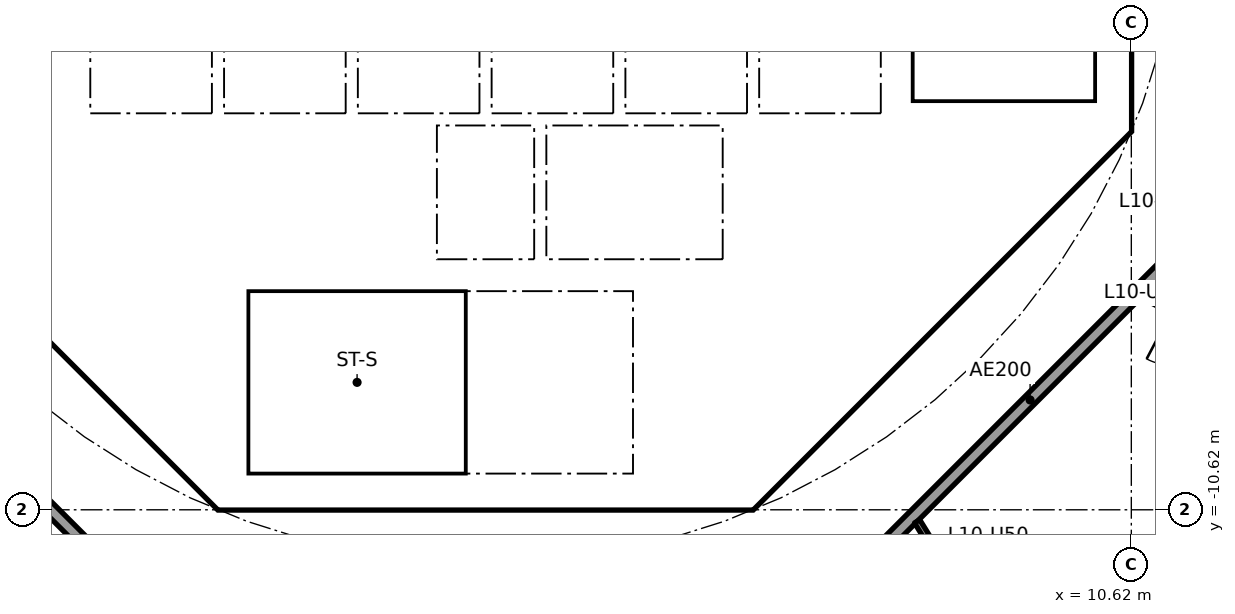
"""IFC4 building model, lengths in metres.
Left out: names, types, materials, properties, quantities, classifications, styles, units other than length and angle.
Written with IfcOpenShell. Run it as: python <this file> out.ifc"""

import sys

from ifc_helpers import new_model, si_unit, direction, frame, frame_2d, origin, place, context, subcontext, project, spatial, polyline, rectangle, outline, extrude, element, fill, save


model = new_model("IFC4")
c1 = context("Model", 3, precision=1e-05, world=origin(), true_north=direction((0.0, 1.0)))
c2 = subcontext(c1, "Body", "Model", "MODEL_VIEW")
j1 = project(units=[si_unit("LENGTHUNIT", "METRE"), si_unit("PLANEANGLEUNIT", "RADIAN")], contexts=[c1])
p1 = place(None, origin())
s1 = spatial("IfcSite", under=j1, at=p1, CompositionType="ELEMENT")
p2 = place(p1, origin())
s2 = spatial("IfcBuilding", under=s1, at=p2, CompositionType="ELEMENT")
p3 = place(p2, frame((0.0, 0.0, 45.5)))
s3 = spatial("IfcBuildingStorey", under=s2, at=p3, CompositionType="ELEMENT", Elevation=45.5)
p4 = place(p3, frame((-9.988, -4.613, 0.0), z_axis=(0.0, 0.0, 1.0), x_axis=(0.707106781187, -0.707106781187, 0.0)))
e1 = element("IfcWall", 1, at=p4, inside=s3, PredefinedType="SHEAR", context=c2, shape_type="SweptSolid", body=[
    extrude(rectangle(XDim=7.602, YDim=0.6, at=frame_2d((3.801, 0.0))), origin(), (0.0, 0.0, 1.0), 3.44),
])
p5 = place(p4, frame((6.151, 0.0, 0.0)))
e2 = element("IfcOpeningElement", 2, at=p5, cuts=e1, PredefinedType="OPENING", context=c2, shape_type="SweptSolid", body=[
    extrude(rectangle(XDim=1.1, YDim=2.1, at=frame_2d((0.55, 1.05))), frame((0.0, 0.31, 0.0), z_axis=(0.0, -1.0, 0.0), x_axis=(1.0, 0.0, 0.0)), (0.0, 0.0, 1.0), 0.62),
])
p6 = place(p3, frame((4.613, -9.988, 0.0), z_axis=(0.0, 0.0, 1.0), x_axis=(0.707106781187, 0.707106781187, 0.0)))
e3 = element("IfcWall", 3, at=p6, inside=s3, PredefinedType="SHEAR", context=c2, shape_type="SweptSolid", body=[
    extrude(rectangle(XDim=7.602, YDim=0.6, at=frame_2d((3.801, 0.0))), origin(), (0.0, 0.0, 1.0), 3.44),
])
p7 = place(p6, frame((3.201, 0.0, 0.0)))
e4 = element("IfcOpeningElement", 4, at=p7, cuts=e3, PredefinedType="OPENING", context=c2, shape_type="SweptSolid", body=[
    extrude(rectangle(XDim=1.2, YDim=2.1, at=frame_2d((0.6, 1.05))), frame((0.0, 0.31, 0.0), z_axis=(0.0, -1.0, 0.0), x_axis=(1.0, 0.0, 0.0)), (0.0, 0.0, 1.0), 0.62),
])
p8 = place(p3, frame((4.0, -10.025, 0.0), z_axis=(0.0, 0.0, 1.0), x_axis=(0.0, 1.0, 0.0)))
e5 = element("IfcWall", 5, at=p8, inside=s3, PredefinedType="SOLIDWALL", context=c2, shape_type="SweptSolid", body=[
    extrude(rectangle(XDim=3.0, YDim=0.2, at=frame_2d((1.5, 0.0))), origin(), (0.0, 0.0, 1.0), 3.44),
])
p9 = place(p8, frame((0.975, 0.0, 0.0)))
e6 = element("IfcOpeningElement", 6, at=p9, cuts=e5, PredefinedType="OPENING", context=c2, shape_type="SweptSolid", body=[
    extrude(rectangle(XDim=1.1, YDim=2.1, at=frame_2d((0.55, 1.05))), frame((0.0, 0.11, 0.0), z_axis=(0.0, -1.0, 0.0), x_axis=(1.0, 0.0, 0.0)), (0.0, 0.0, 1.0), 0.22),
])
p10 = place(p3, frame((-6.2, -7.827, 0.0), z_axis=(0.0, 0.0, 1.0), x_axis=(0.0, 1.0, 0.0)))
e7 = element("IfcWall", 7, at=p10, inside=s3, PredefinedType="PARTITIONING", context=c2, shape_type="SweptSolid", body=[
    extrude(rectangle(XDim=3.527, YDim=0.15, at=frame_2d((1.763, 0.0))), origin(), (0.0, 0.0, 1.0), 3.44),
])
p11 = place(p10, frame((1.276, 0.0, 0.0)))
e8 = element("IfcOpeningElement", 8, at=p11, cuts=e7, PredefinedType="OPENING", context=c2, shape_type="SweptSolid", body=[
    extrude(rectangle(XDim=0.9, YDim=2.1, at=frame_2d((0.45, 1.05))), frame((0.0, 0.085, 0.0), z_axis=(0.0, -1.0, 0.0), x_axis=(1.0, 0.0, 0.0)), (0.0, 0.0, 1.0), 0.17),
])
p12 = place(p3, frame((4.0, -6.5, 0.0), z_axis=(0.0, 0.0, 1.0), x_axis=(0.0, 1.0, 0.0)))
e9 = element("IfcWall", 9, at=p12, inside=s3, PredefinedType="SOLIDWALL", context=c2, shape_type="SweptSolid", body=[
    extrude(rectangle(XDim=2.2, YDim=0.2, at=frame_2d((1.1, 0.0))), origin(), (0.0, 0.0, 1.0), 3.44),
])
p13 = place(p12, frame((0.55, 0.0, 0.0)))
e10 = element("IfcOpeningElement", 10, at=p13, cuts=e9, PredefinedType="OPENING", context=c2, shape_type="SweptSolid", body=[
    extrude(rectangle(XDim=1.1, YDim=2.1, at=frame_2d((0.55, 1.05))), frame((0.0, 0.11, 0.0), z_axis=(0.0, -1.0, 0.0), x_axis=(1.0, 0.0, 0.0)), (0.0, 0.0, 1.0), 0.22),
])
p14 = place(p3, frame((-4.0, -6.5, 0.0), z_axis=(0.0, 0.0, 1.0), x_axis=(0.0, 1.0, 0.0)))
e11 = element("IfcWall", 11, at=p14, inside=s3, PredefinedType="SOLIDWALL", context=c2, shape_type="SweptSolid", body=[
    extrude(rectangle(XDim=2.2, YDim=0.2, at=frame_2d((1.1, 0.0))), origin(), (0.0, 0.0, 1.0), 3.44),
])
p15 = place(p14, frame((0.65, 0.0, 0.0)))
e12 = element("IfcOpeningElement", 12, at=p15, cuts=e11, PredefinedType="OPENING", context=c2, shape_type="SweptSolid", body=[
    extrude(rectangle(XDim=0.9, YDim=2.1, at=frame_2d((0.45, 1.05))), frame((0.0, 0.11, 0.0), z_axis=(0.0, -1.0, 0.0), x_axis=(1.0, 0.0, 0.0)), (0.0, 0.0, 1.0), 0.22),
])
p16 = place(p3, origin())
e13 = element("IfcWall", 13, at=p16, inside=s3, PredefinedType="SHEAR", context=c2, shape_type="SweptSolid", body=[
    extrude(outline(polyline([(-4.152, -10.025), (4.152, -10.025), (4.401, -9.776), (4.825, -10.2), (4.401, -10.625), (-4.401, -10.625), (-4.825, -10.2), (-4.401, -9.776), (-4.152, -10.025)])), origin(), (0.0, 0.0, 1.0), 3.44),
])
p17 = place(p3, origin())
e14 = element("IfcWall", 14, at=p17, inside=s3, PredefinedType="SHEAR", context=c2, shape_type="SweptSolid", body=[
    extrude(outline(polyline([(9.776, -4.401), (10.025, -4.152), (10.025, -3.801), (10.025, 4.152), (9.776, 4.401), (10.2, 4.825), (10.625, 4.401), (10.625, -4.401), (10.2, -4.825), (9.776, -4.401)])), origin(), (0.0, 0.0, 1.0), 3.44),
])
for number, where, z_axis, x_axis in (
    (15, (-0.9, -6.5, 0.0), (0.0, 0.0, 1.0), (0.0, 1.0, 0.0)),
    (16, (0.9, -6.5, 0.0), (0.0, 0.0, 1.0), (0.0, 1.0, 0.0)),
):
    element("IfcWall", number, at=place(p3, frame(where, z_axis=z_axis, x_axis=x_axis)), inside=s3, PredefinedType="SOLIDWALL", context=c2, shape_type="SweptSolid", body=[
        extrude(rectangle(XDim=2.2, YDim=0.2, at=frame_2d((1.1, 0.0))), origin(), (0.0, 0.0, 1.0), 3.44),
    ])
p18 = place(p3, origin())
e17 = element("IfcWall", 17, at=p18, inside=s3, PredefinedType="SOLIDWALL", context=c2, shape_type="SweptSolid", body=[
    extrude(outline(polyline([(-6.7, -2.1), (-6.5, -2.1), (-6.5, -4.1), (-4.5, -4.1), (-4.5, -2.1), (-4.3, -2.1), (-4.3, -4.1), (-2.3, -4.1), (-2.3, -2.1), (-2.1, -2.1), (-2.1, -4.1), (-0.1, -4.1), (-0.1, -2.1), (0.1, -2.1), (0.1, -4.1), (2.1, -4.1), (2.1, -2.1), (2.3, -2.1), (2.3, -4.1), (4.3, -4.1), (4.3, -2.1), (4.5, -2.1), (4.5, -4.1), (6.5, -4.1), (6.5, -2.1), (6.7, -2.1), (6.7, -4.3), (-6.7, -4.3), (-6.7, -2.1)])), origin(), (0.0, 0.0, 1.0), 3.44),
])
p19 = place(p3, frame((-10.025, -4.0, 0.0), z_axis=(0.0, 0.0, 1.0), x_axis=(1.0, 0.0, 0.0)))
e18 = element("IfcWall", 18, at=p19, inside=s3, PredefinedType="PARTITIONING", context=c2, shape_type="SweptSolid", body=[
    extrude(rectangle(XDim=3.325, YDim=0.2, at=frame_2d((1.662, 0.0))), origin(), (0.0, 0.0, 1.0), 3.44),
])
p20 = place(p3, origin())
e19 = element("IfcWall", 19, at=p20, inside=s3, PredefinedType="SOLIDWALL", context=c2, shape_type="SweptSolid", body=[
    extrude(outline(polyline([(-3.9, -10.025), (-4.1, -10.025), (-4.1, -7.025), (-3.9, -7.025), (-3.9, -10.025)])), origin(), (0.0, 0.0, 1.0), 3.44),
])
p21 = place(p3, origin())
e20 = element("IfcWall", 20, at=p21, inside=s3, PredefinedType="SOLIDWALL", context=c2, shape_type="SweptSolid", body=[
    extrude(outline(polyline([(4.1, -7.025), (-4.1, -7.025), (-4.1, -6.5), (4.1, -6.5), (4.1, -7.025)])), origin(), (0.0, 0.0, 1.0), 3.44),
])
p22 = place(p3, origin())
e21 = element("IfcWall", 21, at=p22, inside=s3, PredefinedType="SOLIDWALL", context=c2, shape_type="SweptSolid", body=[
    extrude(outline(polyline([(7.025, -3.9), (6.7, -3.9), (6.7, 3.9), (7.025, 3.9), (7.025, -3.9)])), origin(), (0.0, 0.0, 1.0), 3.44),
])
p23 = place(p3, origin())
e22 = element("IfcWall", 22, at=p23, inside=s3, PredefinedType="SOLIDWALL", context=c2, shape_type="SweptSolid", body=[
    extrude(outline(polyline([(10.025, -4.1), (6.7, -4.1), (6.7, -3.9), (10.025, -3.9), (10.025, -4.1)])), origin(), (0.0, 0.0, 1.0), 3.44),
])
p24 = place(p3, frame((-12.635, -5.134, 0.0), z_axis=(0.0, 0.0, 1.0), x_axis=(0.707106781187, -0.707106781187, 0.0)))
e23 = element("IfcWall", 23, at=p24, inside=s3, PredefinedType="PARTITIONING", context=c2, shape_type="SweptSolid", body=[
    extrude(rectangle(XDim=10.609, YDim=0.2, at=frame_2d((5.305, 0.0))), origin(), (0.0, 0.0, 1.0), 3.44),
])
p25 = place(p3, frame((5.275, -12.494, 0.0), z_axis=(0.0, 0.0, 1.0), x_axis=(0.707106781187, 0.707106781187, 0.0)))
e24 = element("IfcWall", 24, at=p25, inside=s3, PredefinedType="PARTITIONING", context=c2, shape_type="SweptSolid", body=[
    extrude(rectangle(XDim=10.409, YDim=0.2, at=frame_2d((5.205, 0.0))), origin(), (0.0, 0.0, 1.0), 3.44),
])
p26 = place(p25, frame((8.508, 0.0, 0.0)))
e25 = element("IfcOpeningElement", 25, at=p26, cuts=e24, PredefinedType="OPENING", context=c2, shape_type="SweptSolid", body=[
    extrude(rectangle(XDim=1.0, YDim=2.1, at=frame_2d((0.5, 1.05))), frame((0.0, 0.11, 0.0), z_axis=(0.0, -1.0, 0.0), x_axis=(1.0, 0.0, 0.0)), (0.0, 0.0, 1.0), 0.22),
])
p27 = place(p3, frame((7.097, -10.81, 0.0), z_axis=(0.0, 0.0, 1.0), x_axis=(0.526453266471, -0.850204068576, 0.0)))
e26 = element("IfcWall", 26, at=p27, inside=s3, PredefinedType="PARTITIONING", context=c2, shape_type="SweptSolid", body=[
    extrude(rectangle(XDim=19.85, YDim=0.1, at=frame_2d((9.925, 0.0))), origin(), (0.0, 0.0, 1.0), 2.687),
])
p28 = place(p27, frame((0.35, 0.0, 0.0)))
e27 = element("IfcOpeningElement", 27, at=p28, cuts=e26, PredefinedType="OPENING", context=c2, shape_type="SweptSolid", body=[
    extrude(rectangle(XDim=0.9, YDim=2.1, at=frame_2d((0.45, 1.05))), frame((0.0, 0.06, 0.0), z_axis=(0.0, -1.0, 0.0), x_axis=(1.0, 0.0, 0.0)), (0.0, 0.0, 1.0), 0.12),
])
p29 = place(p27, frame((8.795, 0.0, 0.0)))
e28 = element("IfcOpeningElement", 28, at=p29, cuts=e26, PredefinedType="OPENING", context=c2, shape_type="SweptSolid", body=[
    extrude(rectangle(XDim=0.9, YDim=2.1, at=frame_2d((0.45, 1.05))), frame((0.0, 0.06, 0.0), z_axis=(0.0, -1.0, 0.0), x_axis=(1.0, 0.0, 0.0)), (0.0, 0.0, 1.0), 0.12),
])
p30 = place(p27, frame((15.935, 0.0, 0.0)))
e29 = element("IfcOpeningElement", 29, at=p30, cuts=e26, PredefinedType="OPENING", context=c2, shape_type="SweptSolid", body=[
    extrude(rectangle(XDim=0.9, YDim=2.1, at=frame_2d((0.45, 1.05))), frame((0.0, 0.06, 0.0), z_axis=(0.0, -1.0, 0.0), x_axis=(1.0, 0.0, 0.0)), (0.0, 0.0, 1.0), 0.12),
])
p31 = place(p3, frame((10.813, -7.091, 0.0), z_axis=(0.0, 0.0, 1.0), x_axis=(0.885182649479, -0.465243674928, 0.0)))
e30 = element("IfcWall", 30, at=p31, inside=s3, PredefinedType="PARTITIONING", context=c2, shape_type="SweptSolid", body=[
    extrude(rectangle(XDim=12.551, YDim=0.1, at=frame_2d((6.275, 0.0))), origin(), (0.0, 0.0, 1.0), 2.687),
])
p32 = place(p31, frame((0.539, 0.0, 0.0)))
e31 = element("IfcOpeningElement", 31, at=p32, cuts=e30, PredefinedType="OPENING", context=c2, shape_type="SweptSolid", body=[
    extrude(rectangle(XDim=0.9, YDim=2.1, at=frame_2d((0.45, 1.05))), frame((0.0, 0.06, 0.0), z_axis=(0.0, -1.0, 0.0), x_axis=(1.0, 0.0, 0.0)), (0.0, 0.0, 1.0), 0.12),
])
p33 = place(p31, frame((8.494, 0.0, 0.0)))
e32 = element("IfcOpeningElement", 32, at=p33, cuts=e30, PredefinedType="OPENING", context=c2, shape_type="SweptSolid", body=[
    extrude(rectangle(XDim=0.9, YDim=2.1, at=frame_2d((0.45, 1.05))), frame((0.0, 0.06, 0.0), z_axis=(0.0, -1.0, 0.0), x_axis=(1.0, 0.0, 0.0)), (0.0, 0.0, 1.0), 0.12),
])
p34 = place(p13, origin())
e33 = element("IfcDoor", 33, at=p34, inside=s3, OperationType="DOUBLE_DOOR_SLIDING", PredefinedType="DOOR", context=c2, shape_type="SweptSolid", body=[
    extrude(rectangle(XDim=1.1, YDim=2.1, at=frame_2d((0.55, 1.05))), frame((0.0, 0.025, 0.0), z_axis=(0.0, -1.0, 0.0), x_axis=(1.0, 0.0, 0.0)), (0.0, 0.0, 1.0), 0.05),
])
fill(e10, e33)
p35 = place(p9, origin())
e34 = element("IfcDoor", 34, at=p35, inside=s3, OperationType="SINGLE_SWING_RIGHT", PredefinedType="DOOR", context=c2, shape_type="SweptSolid", body=[
    extrude(rectangle(XDim=1.1, YDim=2.1, at=frame_2d((0.55, 1.05))), frame((0.0, 0.025, 0.0), z_axis=(0.0, -1.0, 0.0), x_axis=(1.0, 0.0, 0.0)), (0.0, 0.0, 1.0), 0.05),
])
fill(e6, e34)
p36 = place(p11, origin())
e35 = element("IfcDoor", 35, at=p36, inside=s3, OperationType="SINGLE_SWING_RIGHT", PredefinedType="DOOR", context=c2, shape_type="SweptSolid", body=[
    extrude(rectangle(XDim=0.9, YDim=2.1, at=frame_2d((0.45, 1.05))), frame((0.0, 0.025, 0.0), z_axis=(0.0, -1.0, 0.0), x_axis=(1.0, 0.0, 0.0)), (0.0, 0.0, 1.0), 0.05),
])
fill(e8, e35)
p37 = place(p15, frame((0.9, 0.0, 0.0), x_axis=(-1.0, 0.0, 0.0)))
e36 = element("IfcDoor", 36, at=p37, inside=s3, OperationType="SINGLE_SWING_RIGHT", PredefinedType="DOOR", context=c2, shape_type="SweptSolid", body=[
    extrude(rectangle(XDim=0.9, YDim=2.1, at=frame_2d((0.45, 1.05))), frame((0.0, 0.025, 0.0), z_axis=(0.0, -1.0, 0.0), x_axis=(1.0, 0.0, 0.0)), (0.0, 0.0, 1.0), 0.05),
])
fill(e12, e36)
p38 = place(p7, origin())
e37 = element("IfcDoor", 37, at=p38, inside=s3, OperationType="SINGLE_SWING_RIGHT", PredefinedType="DOOR", context=c2, shape_type="SweptSolid", body=[
    extrude(rectangle(XDim=1.2, YDim=2.1, at=frame_2d((0.6, 1.05))), frame((0.0, 0.025, 0.0), z_axis=(0.0, -1.0, 0.0), x_axis=(1.0, 0.0, 0.0)), (0.0, 0.0, 1.0), 0.05),
])
fill(e4, e37)
p39 = place(p5, origin())
e38 = element("IfcDoor", 38, at=p39, inside=s3, OperationType="SINGLE_SWING_RIGHT", PredefinedType="DOOR", context=c2, shape_type="SweptSolid", body=[
    extrude(rectangle(XDim=1.1, YDim=2.1, at=frame_2d((0.55, 1.05))), frame((0.0, 0.025, 0.0), z_axis=(0.0, -1.0, 0.0), x_axis=(1.0, 0.0, 0.0)), (0.0, 0.0, 1.0), 0.05),
])
fill(e2, e38)
save(model, sys.argv[1])
